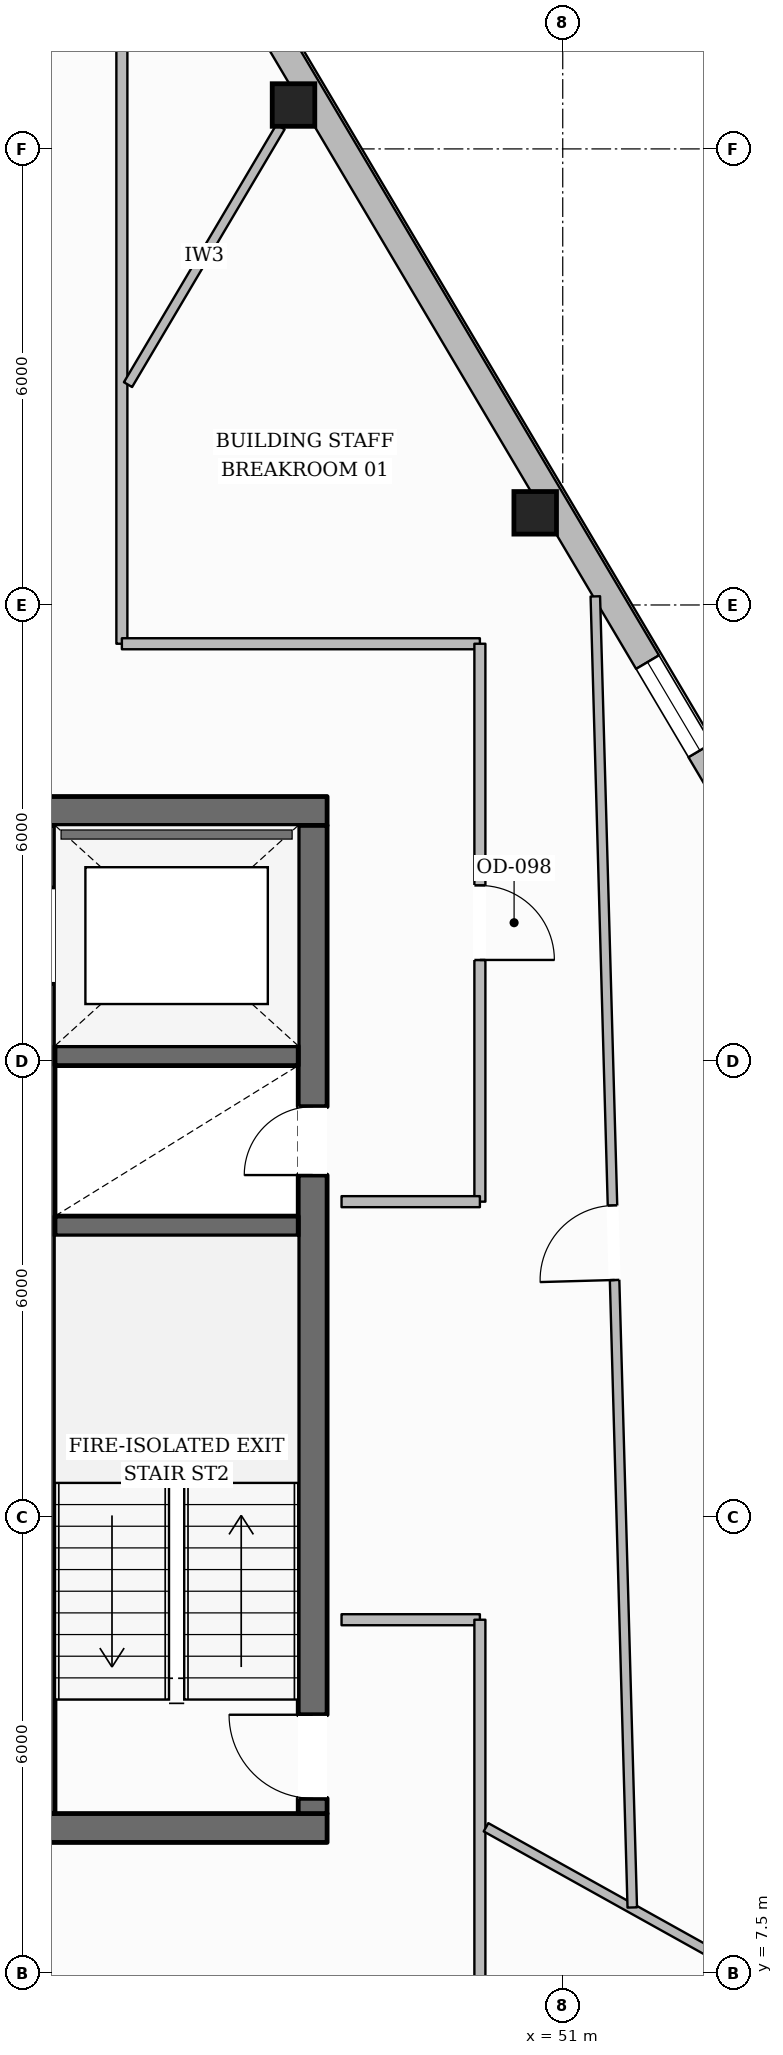
"""IFC4 building model, lengths in metres.
Left out: names, types, materials, properties, quantities, classifications, styles, units other than length and angle.
Written with IfcOpenShell. Run it as: python <this file> out.ifc"""

import sys

from ifc_helpers import new_model, si_unit, direction, frame, frame_2d, origin, origin_2d, place, context, subcontext, project, spatial, rectangle, hollow_rectangle, extrude, element, fill, save


model = new_model("IFC4")
c1 = context("Model", 3, precision=1e-05, world=origin(), true_north=direction((0.0, 1.0)))
c2 = subcontext(c1, "Body", "Model", "MODEL_VIEW")
j1 = project(units=[si_unit("LENGTHUNIT", "METRE"), si_unit("PLANEANGLEUNIT", "RADIAN")], contexts=[c1])
p1 = place(None, origin())
s1 = spatial("IfcSite", under=j1, at=p1, CompositionType="ELEMENT")
p2 = place(p1, origin())
s2 = spatial("IfcBuilding", under=s1, at=p2, CompositionType="ELEMENT")
p3 = place(p2, frame((0.0, 0.0, 270.3)))
s3 = spatial("IfcBuildingStorey", under=s2, at=p3, CompositionType="ELEMENT", Elevation=270.3)
p4 = place(p3, frame((28.1, 9.41, 0.0), z_axis=(0.0, 0.0, 1.0), x_axis=(1.0, 0.0, 0.0)))
e1 = element("IfcWall", 1, at=p4, inside=s3, PredefinedType="SOLIDWALL", context=c2, shape_type="SweptSolid", body=[
    extrude(rectangle(XDim=19.8, YDim=0.38, at=frame_2d((9.9, 0.0))), origin(), (0.0, 0.0, 1.0), 3.61),
])
p5 = place(p4, frame((10.4, 0.0, 0.0)))
e2 = element("IfcOpeningElement", 2, at=p5, cuts=e1, PredefinedType="OPENING", context=c2, shape_type="SweptSolid", body=[
    extrude(rectangle(XDim=1.4, YDim=2.2, at=frame_2d((0.7, 1.1))), frame((0.0, 0.2, 0.0), z_axis=(0.0, -1.0, 0.0), x_axis=(1.0, 0.0, 0.0)), (0.0, 0.0, 1.0), 0.4),
])
p6 = place(p3, frame((28.1, 22.79, 0.0), z_axis=(0.0, 0.0, 1.0), x_axis=(1.0, 0.0, 0.0)))
e3 = element("IfcWall", 3, at=p6, inside=s3, PredefinedType="SOLIDWALL", context=c2, shape_type="SweptSolid", body=[
    extrude(rectangle(XDim=19.8, YDim=0.38, at=frame_2d((9.9, 0.0))), origin(), (0.0, 0.0, 1.0), 3.61),
])
p7 = place(p6, frame((6.175, 0.0, 0.0)))
e4 = element("IfcOpeningElement", 4, at=p7, cuts=e3, PredefinedType="OPENING", context=c2, shape_type="SweptSolid", body=[
    extrude(rectangle(XDim=1.05, YDim=2.15, at=frame_2d((0.525, 1.075))), frame((0.0, 0.2, 0.0), z_axis=(0.0, -1.0, 0.0), x_axis=(1.0, 0.0, 0.0)), (0.0, 0.0, 1.0), 0.4),
])
p8 = place(p6, frame((12.575, 0.0, 0.0)))
e5 = element("IfcOpeningElement", 5, at=p8, cuts=e3, PredefinedType="OPENING", context=c2, shape_type="SweptSolid", body=[
    extrude(rectangle(XDim=1.05, YDim=2.15, at=frame_2d((0.525, 1.075))), frame((0.0, 0.2, 0.0), z_axis=(0.0, -1.0, 0.0), x_axis=(1.0, 0.0, 0.0)), (0.0, 0.0, 1.0), 0.4),
])
p9 = place(p3, frame((47.71, 9.6, 0.0), z_axis=(0.0, 0.0, 1.0), x_axis=(0.0, 1.0, 0.0)))
e6 = element("IfcWall", 6, at=p9, inside=s3, PredefinedType="SOLIDWALL", context=c2, shape_type="SweptSolid", body=[
    extrude(rectangle(XDim=13.0, YDim=0.38, at=frame_2d((6.5, 0.0))), origin(), (0.0, 0.0, 1.0), 3.61),
])
p10 = place(p9, frame((0.2, 0.0, 0.0)))
e7 = element("IfcOpeningElement", 7, at=p10, cuts=e6, PredefinedType="OPENING", context=c2, shape_type="SweptSolid", body=[
    extrude(rectangle(XDim=1.1, YDim=2.15, at=frame_2d((0.55, 1.075))), frame((0.0, 0.2, 0.0), z_axis=(0.0, -1.0, 0.0), x_axis=(1.0, 0.0, 0.0)), (0.0, 0.0, 1.0), 0.4),
])
p11 = place(p9, frame((8.4, 0.0, 0.0)))
e8 = element("IfcOpeningElement", 8, at=p11, cuts=e6, PredefinedType="OPENING", context=c2, shape_type="SweptSolid", body=[
    extrude(rectangle(XDim=0.9, YDim=2.1, at=frame_2d((0.45, 1.05))), frame((0.0, 0.2, 0.0), z_axis=(0.0, -1.0, 0.0), x_axis=(1.0, 0.0, 0.0)), (0.0, 0.0, 1.0), 0.4),
])
p12 = place(p3, frame((44.19, 9.6, 0.0), z_axis=(0.0, 0.0, 1.0), x_axis=(0.0, 1.0, 0.0)))
e9 = element("IfcWall", 9, at=p12, inside=s3, PredefinedType="SHEAR", context=c2, shape_type="SweptSolid", body=[
    extrude(rectangle(XDim=13.0, YDim=0.26, at=frame_2d((6.5, 0.0))), origin(), (0.0, 0.0, 1.0), 3.61),
])
p13 = place(p12, frame((10.925, 0.0, 0.0)))
e10 = element("IfcOpeningElement", 10, at=p13, cuts=e9, PredefinedType="OPENING", context=c2, shape_type="SweptSolid", body=[
    extrude(rectangle(XDim=1.25, YDim=2.25, at=frame_2d((0.625, 1.125))), frame((0.0, 0.14, 0.0), z_axis=(0.0, -1.0, 0.0), x_axis=(1.0, 0.0, 0.0)), (0.0, 0.0, 1.0), 0.28),
])
for number, where, z_axis, x_axis in (
    (11, (44.32, 17.33, 0.0), (0.0, 0.0, 1.0), (1.0, 0.0, 0.0)),
    (12, (44.32, 19.57, 0.0), (0.0, 0.0, 1.0), (1.0, 0.0, 0.0)),
):
    element("IfcWall", number, at=place(p3, frame(where, z_axis=z_axis, x_axis=x_axis)), inside=s3, PredefinedType="SHEAR", context=c2, shape_type="SweptSolid", body=[
        extrude(rectangle(XDim=3.2, YDim=0.26, at=frame_2d((1.6, 0.0))), origin(), (0.0, 0.0, 1.0), 3.61),
    ])
for number, where, z_axis, x_axis in (
    (13, (50.638, 26.712, 0.0), (0.0, 0.0, 1.0), (1.0, 0.0, 0.0)),
    (14, (47.458, 32.077, 0.0), (0.0, 0.0, 1.0), (1.0, 0.0, 0.0)),
):
    element("IfcColumn", number, at=place(p3, frame(where, z_axis=z_axis, x_axis=x_axis)), inside=s3, PredefinedType="COLUMN", context=c2, shape_type="SweptSolid", body=[
        extrude(hollow_rectangle(XDim=0.56, YDim=0.56, WallThickness=0.025, at=origin_2d()), origin(), (0.0, 0.0, 1.0), 3.61),
    ])
p14 = place(p3, frame((41.09, 43.352, 0.0), z_axis=(0.0, 0.0, 1.0), x_axis=(0.509850521087, -0.860263009868, 0.0)))
e15 = element("IfcWall", 15, at=p14, inside=s3, PredefinedType="STANDARD", context=c2, shape_type="SweptSolid", body=[
    extrude(rectangle(XDim=38.375, YDim=0.35, at=frame_2d((19.188, 0.0))), origin(), (0.0, 0.0, 1.0), 3.196),
])
p15 = place(p14, frame((28.181, 0.0, 0.0)))
e16 = element("IfcOpeningElement", 16, at=p15, cuts=e15, PredefinedType="OPENING", context=c2, shape_type="SweptSolid", body=[
    extrude(rectangle(XDim=1.0, YDim=2.2, at=frame_2d((0.5, 1.1))), frame((0.0, 0.185, 0.0), z_axis=(0.0, -1.0, 0.0), x_axis=(1.0, 0.0, 0.0)), (0.0, 0.0, 1.0), 0.37),
])
p16 = place(p14, frame((34.098, 0.0, 0.65)))
e17 = element("IfcOpeningElement", 17, at=p16, cuts=e15, PredefinedType="OPENING", context=c2, shape_type="SweptSolid", body=[
    extrude(rectangle(XDim=1.35, YDim=1.75, at=frame_2d((0.675, 0.875))), frame((0.0, 0.185, 0.0), z_axis=(0.0, -1.0, 0.0), x_axis=(1.0, 0.0, 0.0)), (0.0, 0.0, 1.0), 0.37),
])
p17 = place(p14, frame((21.625, 0.0, 0.65)))
e18 = element("IfcOpeningElement", 18, at=p17, cuts=e15, PredefinedType="OPENING", context=c2, shape_type="SweptSolid", body=[
    extrude(rectangle(XDim=1.35, YDim=1.75, at=frame_2d((0.675, 0.875))), frame((0.0, 0.185, 0.0), z_axis=(0.0, -1.0, 0.0), x_axis=(1.0, 0.0, 0.0)), (0.0, 0.0, 1.0), 0.37),
])
p18 = place(p14, frame((9.152, 0.0, 0.65)))
e19 = element("IfcOpeningElement", 19, at=p18, cuts=e15, PredefinedType="OPENING", context=c2, shape_type="SweptSolid", body=[
    extrude(rectangle(XDim=1.35, YDim=1.75, at=frame_2d((0.675, 0.875))), frame((0.0, 0.185, 0.0), z_axis=(0.0, -1.0, 0.0), x_axis=(1.0, 0.0, 0.0)), (0.0, 0.0, 1.0), 0.37),
])
p19 = place(p14, frame((2.915, 0.0, 0.65)))
e20 = element("IfcOpeningElement", 20, at=p19, cuts=e15, PredefinedType="OPENING", context=c2, shape_type="SweptSolid", body=[
    extrude(rectangle(XDim=1.35, YDim=1.75, at=frame_2d((0.675, 0.875))), frame((0.0, 0.185, 0.0), z_axis=(0.0, -1.0, 0.0), x_axis=(1.0, 0.0, 0.0)), (0.0, 0.0, 1.0), 0.37),
])
p20 = place(p3, frame((45.2, 33.79, 0.0), z_axis=(0.0, 0.0, 1.0), x_axis=(0.0, -1.0, 0.0)))
e21 = element("IfcWall", 21, at=p20, inside=s3, PredefinedType="PARTITIONING", context=c2, shape_type="SweptSolid", body=[
    extrude(rectangle(XDim=8.8, YDim=0.145, at=frame_2d((4.4, 0.0))), origin(), (0.0, 0.0, 1.0), 3.61),
])
p21 = place(p3, frame((45.2, 24.99, 0.0), z_axis=(0.0, 0.0, 1.0), x_axis=(1.0, 0.0, 0.0)))
e22 = element("IfcWall", 22, at=p21, inside=s3, PredefinedType="PARTITIONING", context=c2, shape_type="SweptSolid", body=[
    extrude(rectangle(XDim=4.71, YDim=0.145, at=frame_2d((2.355, 0.0))), origin(), (0.0, 0.0, 1.0), 3.61),
])
p22 = place(p3, frame((49.91, 24.99, 0.0), z_axis=(0.0, 0.0, 1.0), x_axis=(0.0, -1.0, 0.0)))
e23 = element("IfcWall", 23, at=p22, inside=s3, PredefinedType="PARTITIONING", context=c2, shape_type="SweptSolid", body=[
    extrude(rectangle(XDim=7.34, YDim=0.145, at=frame_2d((3.67, 0.0))), origin(), (0.0, 0.0, 1.0), 3.349),
])
p23 = place(p22, frame((3.18, 0.0, 0.0)))
e24 = element("IfcOpeningElement", 24, at=p23, cuts=e23, PredefinedType="OPENING", context=c2, shape_type="SweptSolid", body=[
    extrude(rectangle(XDim=0.98, YDim=2.15, at=frame_2d((0.49, 1.075))), frame((0.0, 0.083, 0.0), z_axis=(0.0, -1.0, 0.0), x_axis=(1.0, 0.0, 0.0)), (0.0, 0.0, 1.0), 0.165),
])
for number, where, z_axis, x_axis in (
    (25, (49.91, 17.65, 0.0), (0.0, 0.0, 1.0), (-1.0, 0.0, 0.0)),
    (26, (48.09, 12.15, 0.0), (0.0, 0.0, 1.0), (1.0, 0.0, 0.0)),
):
    element("IfcWall", number, at=place(p3, frame(where, z_axis=z_axis, x_axis=x_axis)), inside=s3, PredefinedType="PARTITIONING", context=c2, shape_type="SweptSolid", body=[
        extrude(rectangle(XDim=1.82, YDim=0.145, at=frame_2d((0.91, 0.0))), origin(), (0.0, 0.0, 1.0), 3.61),
    ])
p24 = place(p3, frame((49.91, 12.15, 0.0), z_axis=(0.0, 0.0, 1.0), x_axis=(0.0, -1.0, 0.0)))
e27 = element("IfcWall", 27, at=p24, inside=s3, PredefinedType="PARTITIONING", context=c2, shape_type="SweptSolid", body=[
    extrude(rectangle(XDim=4.94, YDim=0.145, at=frame_2d((2.47, 0.0))), origin(), (0.0, 0.0, 1.0), 3.61),
])
p25 = place(p3, frame((45.281, 28.399, 0.0), z_axis=(0.0, 0.0, 1.0), x_axis=(0.509420165647, 0.860517922435, 0.0)))
e28 = element("IfcWall", 28, at=p25, inside=s3, PredefinedType="PARTITIONING", context=c2, shape_type="SweptSolid", body=[
    extrude(rectangle(XDim=3.94, YDim=0.125, at=frame_2d((1.97, 0.0))), origin(), (0.0, 0.0, 1.0), 3.61),
])
p26 = place(p3, frame((49.99, 9.419, 0.0), z_axis=(0.0, 0.0, 1.0), x_axis=(0.873576073391, -0.486687624662, 0.0)))
e29 = element("IfcWall", 29, at=p26, inside=s3, PredefinedType="PARTITIONING", context=c2, shape_type="SweptSolid", body=[
    extrude(rectangle(XDim=7.875, YDim=0.125, at=frame_2d((3.938, 0.0))), origin(), (0.0, 0.0, 1.0), 3.246),
])
p27 = place(p3, frame((51.915, 8.365, 0.0), z_axis=(0.0, 0.0, 1.0), x_axis=(-0.028169991023, 0.999603147057, 0.0)))
e30 = element("IfcWall", 30, at=p27, inside=s3, PredefinedType="PARTITIONING", context=c2, shape_type="SweptSolid", body=[
    extrude(rectangle(XDim=17.255, YDim=0.125, at=frame_2d((8.628, 0.0))), origin(), (0.0, 0.0, 1.0), 3.199),
])
p28 = place(p27, frame((8.259, 0.0, 0.0)))
e31 = element("IfcOpeningElement", 31, at=p28, cuts=e30, PredefinedType="OPENING", context=c2, shape_type="SweptSolid", body=[
    extrude(rectangle(XDim=0.98, YDim=2.15, at=frame_2d((0.49, 1.075))), frame((0.0, 0.073, 0.0), z_axis=(0.0, -1.0, 0.0), x_axis=(1.0, 0.0, 0.0)), (0.0, 0.0, 1.0), 0.145),
])
p29 = place(p17, origin())
e32 = element("IfcWindow", 32, at=p29, inside=s3, PartitioningType="SINGLE_PANEL", PredefinedType="WINDOW", context=c2, shape_type="SweptSolid", body=[
    extrude(rectangle(XDim=1.35, YDim=1.75, at=frame_2d((0.675, 0.875))), frame((0.0, 0.03, 0.0), z_axis=(0.0, -1.0, 0.0), x_axis=(1.0, 0.0, 0.0)), (0.0, 0.0, 1.0), 0.06),
])
fill(e18, e32)
p30 = place(p10, origin())
e33 = element("IfcDoor", 33, at=p30, inside=s3, OperationType="SINGLE_SWING_RIGHT", PredefinedType="DOOR", context=c2, shape_type="SweptSolid", body=[
    extrude(rectangle(XDim=1.1, YDim=2.15, at=frame_2d((0.55, 1.075))), frame((0.0, 0.025, 0.0), z_axis=(0.0, -1.0, 0.0), x_axis=(1.0, 0.0, 0.0)), (0.0, 0.0, 1.0), 0.05),
])
fill(e7, e33)
p31 = place(p11, origin())
e34 = element("IfcDoor", 34, at=p31, inside=s3, OperationType="SINGLE_SWING_LEFT", PredefinedType="DOOR", context=c2, shape_type="SweptSolid", body=[
    extrude(rectangle(XDim=0.9, YDim=2.1, at=frame_2d((0.45, 1.05))), frame((0.0, 0.025, 0.0), z_axis=(0.0, -1.0, 0.0), x_axis=(1.0, 0.0, 0.0)), (0.0, 0.0, 1.0), 0.05),
])
fill(e8, e34)
p32 = place(p23, origin())
e35 = element("IfcDoor", 35, at=p32, inside=s3, OperationType="SINGLE_SWING_RIGHT", PredefinedType="DOOR", context=c2, shape_type="SweptSolid", body=[
    extrude(rectangle(XDim=0.98, YDim=2.15, at=frame_2d((0.49, 1.075))), frame((0.0, 0.025, 0.0), z_axis=(0.0, -1.0, 0.0), x_axis=(1.0, 0.0, 0.0)), (0.0, 0.0, 1.0), 0.05),
])
fill(e24, e35)
p33 = place(p28, origin())
e36 = element("IfcDoor", 36, at=p33, inside=s3, OperationType="SINGLE_SWING_LEFT", PredefinedType="DOOR", context=c2, shape_type="SweptSolid", body=[
    extrude(rectangle(XDim=0.98, YDim=2.15, at=frame_2d((0.49, 1.075))), frame((0.0, 0.025, 0.0), z_axis=(0.0, -1.0, 0.0), x_axis=(1.0, 0.0, 0.0)), (0.0, 0.0, 1.0), 0.05),
])
fill(e31, e36)
save(model, sys.argv[1])
